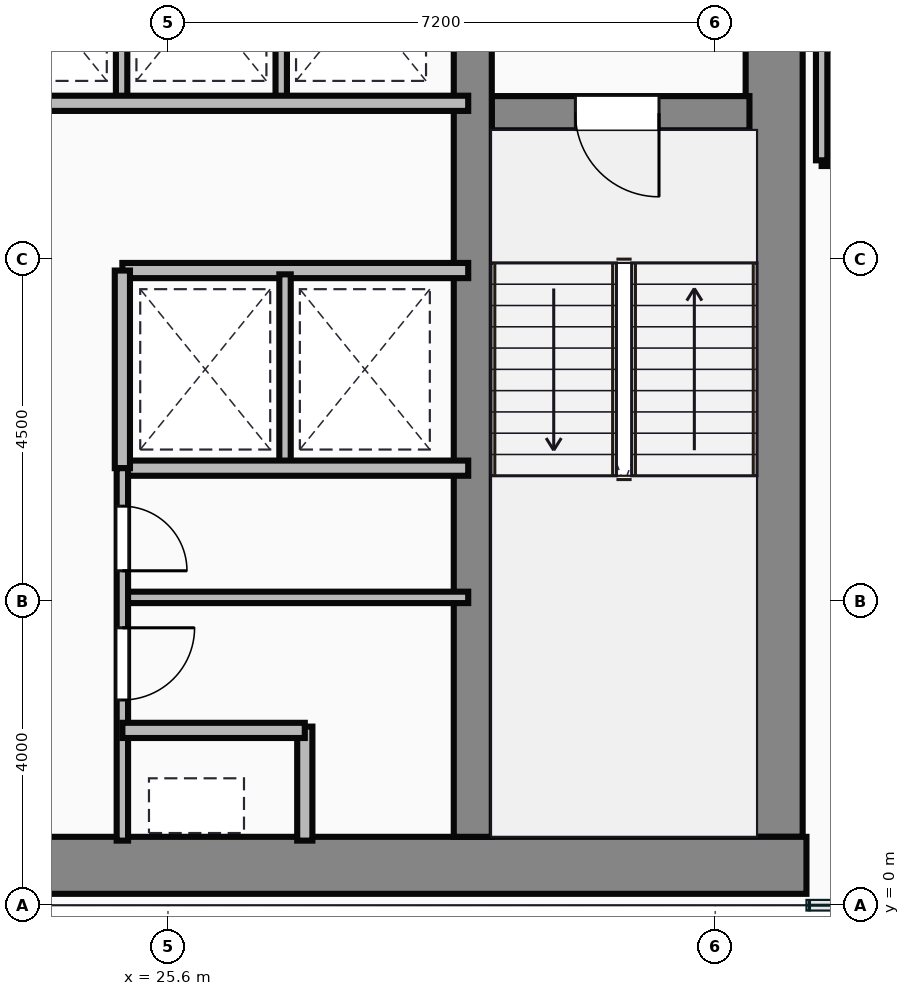
"""IFC4 building model, lengths in metres.
Left out: names, types, materials, properties, quantities, classifications, styles, units other than length and angle.
Written with IfcOpenShell. Run it as: python <this file> out.ifc"""

import sys

from ifc_helpers import new_model, si_unit, direction, frame, frame_2d, origin, place, context, subcontext, project, spatial, rectangle, extrude, source, transform, mapped, element, fill, save


model = new_model("IFC4")
c1 = context("Model", 3, precision=1e-05, world=origin(), true_north=direction((0.0, 1.0)))
c2 = subcontext(c1, "Body", "Model", "MODEL_VIEW")
j1 = project(units=[si_unit("LENGTHUNIT", "METRE"), si_unit("PLANEANGLEUNIT", "RADIAN")], contexts=[c1])
p1 = place(None, origin())
s1 = spatial("IfcSite", under=j1, at=p1, CompositionType="ELEMENT")
p2 = place(p1, origin())
s2 = spatial("IfcBuilding", under=s1, at=p2, CompositionType="ELEMENT")
p3 = place(p2, frame((0.0, 0.0, 151.55)))
s3 = spatial("IfcBuildingStorey", under=s2, at=p3, CompositionType="ELEMENT", Elevation=151.55)
m1 = source(origin(), c2, "Body", "SweptSolid", [
    extrude(rectangle(XDim=29.5, YDim=0.75, at=frame_2d((14.75, 0.0))), origin(), (0.0, 0.0, 1.0), 3.65),
])
p4 = place(p3, frame((4.5, 0.525, 0.0), z_axis=(0.0, 0.0, 1.0), x_axis=(1.0, 0.0, 0.0)))
e1 = element("IfcWall", 1, at=p4, inside=s3, PredefinedType="SHEAR", context=c2, shape_type="MappedRepresentation", body=[
    mapped(m1, transform((0.0, 0.0, 0.0))),
])
m2 = source(origin(), c2, "Body", "SweptSolid", [
    extrude(rectangle(XDim=13.1, YDim=0.75, at=frame_2d((6.55, 0.0))), origin(), (0.0, 0.0, 1.0), 3.65),
])
p5 = place(p3, frame((33.575, 0.9, 0.0), z_axis=(0.0, 0.0, 1.0), x_axis=(0.0, 1.0, 0.0)))
e2 = element("IfcWall", 2, at=p5, inside=s3, PredefinedType="SHEAR", context=c2, shape_type="MappedRepresentation", body=[
    mapped(m2, transform((0.0, 0.0, 0.0))),
])
m3 = source(origin(), c2, "Body", "SweptSolid", [
    extrude(rectangle(XDim=12.35, YDim=0.5, at=frame_2d((6.175, 0.0))), origin(), (0.0, 0.0, 1.0), 3.65),
])
p6 = place(p3, frame((29.61, 0.9, 0.0), z_axis=(0.0, 0.0, 1.0), x_axis=(0.0, 1.0, 0.0)))
e3 = element("IfcWall", 3, at=p6, inside=s3, PredefinedType="SHEAR", context=c2, shape_type="MappedRepresentation", body=[
    mapped(m3, transform((0.0, 0.0, 0.0))),
])
m4 = source(origin(), c2, "Body", "SweptSolid", [
    extrude(rectangle(XDim=3.39, YDim=0.45, at=frame_2d((1.695, 0.0))), origin(), (0.0, 0.0, 1.0), 3.65),
])
p7 = place(p3, frame((29.86, 10.42, 0.0), z_axis=(0.0, 0.0, 1.0), x_axis=(1.0, 0.0, 0.0)))
e4 = element("IfcWall", 4, at=p7, inside=s3, PredefinedType="SHEAR", context=c2, shape_type="MappedRepresentation", body=[
    mapped(m4, transform((0.0, 0.0, 0.0))),
])
p8 = place(p7, frame((1.1, 0.0, 0.0)))
e5 = element("IfcOpeningElement", 5, at=p8, cuts=e4, PredefinedType="OPENING", context=c2, shape_type="SweptSolid", body=[
    extrude(rectangle(XDim=1.1, YDim=2.15, at=frame_2d((0.55, 1.075))), frame((0.0, 0.235, 0.0), z_axis=(0.0, -1.0, 0.0), x_axis=(1.0, 0.0, 0.0)), (0.0, 0.0, 1.0), 0.47),
])
m5 = source(origin(), c2, "Body", "SweptSolid", [
    extrude(rectangle(XDim=8.8, YDim=0.2, at=frame_2d((4.4, 0.0))), origin(), (0.0, 0.0, 1.0), 3.4),
])
p9 = place(p3, frame((20.75, 10.55, 0.0), z_axis=(0.0, 0.0, 1.0), x_axis=(1.0, 0.0, 0.0)))
e6 = element("IfcWall", 6, at=p9, inside=s3, PredefinedType="PARTITIONING", context=c2, shape_type="MappedRepresentation", body=[
    mapped(m5, transform((0.0, 0.0, 0.0))),
])
m6 = source(origin(), c2, "Body", "SweptSolid", [
    extrude(rectangle(XDim=2.85, YDim=0.15, at=frame_2d((1.425, 0.0))), origin(), (0.0, 0.0, 1.0), 3.4),
])
for number, where, z_axis, x_axis in (
    (7, (24.99, 10.6, 0.0), (0.0, 0.0, 1.0), (0.0, 1.0, 0.0)),
    (8, (27.09, 10.6, 0.0), (0.0, 0.0, 1.0), (0.0, 1.0, 0.0)),
):
    element("IfcWall", number, at=place(p3, frame(where, z_axis=z_axis, x_axis=x_axis)), inside=s3, PredefinedType="PARTITIONING", context=c2, shape_type="MappedRepresentation", body=[
        mapped(m6, transform((0.0, 0.0, 0.0))),
    ])
m7 = source(origin(), c2, "Body", "SweptSolid", [
    extrude(rectangle(XDim=4.55, YDim=0.2, at=frame_2d((2.275, 0.0))), origin(), (0.0, 0.0, 1.0), 3.4),
])
for number, where, z_axis, x_axis in (
    (9, (25.0, 8.35, 0.0), (0.0, 0.0, 1.0), (1.0, 0.0, 0.0)),
    (10, (25.0, 5.75, 0.0), (0.0, 0.0, 1.0), (1.0, 0.0, 0.0)),
):
    element("IfcWall", number, at=place(p3, frame(where, z_axis=z_axis, x_axis=x_axis)), inside=s3, PredefinedType="PARTITIONING", context=c2, shape_type="MappedRepresentation", body=[
        mapped(m7, transform((0.0, 0.0, 0.0))),
    ])
m8 = source(origin(), c2, "Body", "SweptSolid", [
    extrude(rectangle(XDim=2.6, YDim=0.2, at=frame_2d((1.3, 0.0))), origin(), (0.0, 0.0, 1.0), 3.4),
])
p10 = place(p3, frame((25.0, 5.75, 0.0), z_axis=(0.0, 0.0, 1.0), x_axis=(0.0, 1.0, 0.0)))
e11 = element("IfcWall", 11, at=p10, inside=s3, PredefinedType="PARTITIONING", context=c2, shape_type="MappedRepresentation", body=[
    mapped(m8, transform((0.0, 0.0, 0.0))),
])
m9 = source(origin(), c2, "Body", "SweptSolid", [
    extrude(rectangle(XDim=2.5, YDim=0.15, at=frame_2d((1.25, 0.0))), origin(), (0.0, 0.0, 1.0), 3.4),
])
p11 = place(p3, frame((27.14, 5.8, 0.0), z_axis=(0.0, 0.0, 1.0), x_axis=(0.0, 1.0, 0.0)))
e12 = element("IfcWall", 12, at=p11, inside=s3, PredefinedType="PARTITIONING", context=c2, shape_type="MappedRepresentation", body=[
    mapped(m9, transform((0.0, 0.0, 0.0))),
])
m10 = source(origin(), c2, "Body", "SweptSolid", [
    extrude(rectangle(XDim=4.9, YDim=0.15, at=frame_2d((2.45, 0.0))), origin(), (0.0, 0.0, 1.0), 3.4),
])
p12 = place(p3, frame((25.0, 0.85, 0.0), z_axis=(0.0, 0.0, 1.0), x_axis=(0.0, 1.0, 0.0)))
e13 = element("IfcWall", 13, at=p12, inside=s3, PredefinedType="PARTITIONING", context=c2, shape_type="MappedRepresentation", body=[
    mapped(m10, transform((0.0, 0.0, 0.0))),
])
p13 = place(p12, frame((1.85, 0.0, 0.0)))
e14 = element("IfcOpeningElement", 14, at=p13, cuts=e13, PredefinedType="OPENING", context=c2, shape_type="SweptSolid", body=[
    extrude(rectangle(XDim=0.95, YDim=2.15, at=frame_2d((0.475, 1.075))), frame((0.0, 0.085, 0.0), z_axis=(0.0, -1.0, 0.0), x_axis=(1.0, 0.0, 0.0)), (0.0, 0.0, 1.0), 0.17),
])
p14 = place(p12, frame((3.55, 0.0, 0.0)))
e15 = element("IfcOpeningElement", 15, at=p14, cuts=e13, PredefinedType="OPENING", context=c2, shape_type="SweptSolid", body=[
    extrude(rectangle(XDim=0.85, YDim=2.15, at=frame_2d((0.425, 1.075))), frame((0.0, 0.085, 0.0), z_axis=(0.0, -1.0, 0.0), x_axis=(1.0, 0.0, 0.0)), (0.0, 0.0, 1.0), 0.17),
])
m11 = source(origin(), c2, "Body", "SweptSolid", [
    extrude(rectangle(XDim=2.4, YDim=0.2, at=frame_2d((1.2, 0.0))), origin(), (0.0, 0.0, 1.0), 3.4),
])
p15 = place(p3, frame((25.0, 2.3, 0.0), z_axis=(0.0, 0.0, 1.0), x_axis=(1.0, 0.0, 0.0)))
e16 = element("IfcWall", 16, at=p15, inside=s3, PredefinedType="PARTITIONING", context=c2, shape_type="MappedRepresentation", body=[
    mapped(m11, transform((0.0, 0.0, 0.0))),
])
m12 = source(origin(), c2, "Body", "SweptSolid", [
    extrude(rectangle(XDim=1.5, YDim=0.2, at=frame_2d((0.75, 0.0))), origin(), (0.0, 0.0, 1.0), 3.4),
])
p16 = place(p3, frame((27.4, 0.85, 0.0), z_axis=(0.0, 0.0, 1.0), x_axis=(0.0, 1.0, 0.0)))
e17 = element("IfcWall", 17, at=p16, inside=s3, PredefinedType="PARTITIONING", context=c2, shape_type="MappedRepresentation", body=[
    mapped(m12, transform((0.0, 0.0, 0.0))),
])
m13 = source(origin(), c2, "Body", "SweptSolid", [
    extrude(rectangle(XDim=4.55, YDim=0.15, at=frame_2d((2.275, 0.0))), origin(), (0.0, 0.0, 1.0), 3.4),
])
p17 = place(p3, frame((25.0, 4.05, 0.0), z_axis=(0.0, 0.0, 1.0), x_axis=(1.0, 0.0, 0.0)))
e18 = element("IfcWall", 18, at=p17, inside=s3, PredefinedType="PARTITIONING", context=c2, shape_type="MappedRepresentation", body=[
    mapped(m13, transform((0.0, 0.0, 0.0))),
])
m14 = source(origin(), c2, "Body", "SweptSolid", [
    extrude(rectangle(XDim=4.8, YDim=0.15, at=frame_2d((2.4, 0.0))), origin(), (0.0, 0.0, 1.0), 3.4),
])
p18 = place(p3, frame((34.2, 9.8, 0.0), z_axis=(0.0, 0.0, 1.0), x_axis=(1.0, 0.0, 0.0)))
e19 = element("IfcWall", 19, at=p18, inside=s3, PredefinedType="PARTITIONING", context=c2, shape_type="MappedRepresentation", body=[
    mapped(m14, transform((0.0, 0.0, 0.0))),
])
m15 = source(origin(), c2, "Body", "SweptSolid", [
    extrude(rectangle(XDim=4.18, YDim=0.15, at=frame_2d((2.09, 0.0))), origin(), (0.0, 0.0, 1.0), 3.4),
])
p19 = place(p3, frame((34.2, 9.8, 0.0), z_axis=(0.0, 0.0, 1.0), x_axis=(0.0, 1.0, 0.0)))
e20 = element("IfcWall", 20, at=p19, inside=s3, PredefinedType="PARTITIONING", context=c2, shape_type="MappedRepresentation", body=[
    mapped(m15, transform((0.0, 0.0, 0.0))),
])
m16 = source(origin(), c2, "Body", "SweptSolid", [
    extrude(rectangle(XDim=1.1, YDim=2.15, at=frame_2d((0.55, 1.075))), frame((0.0, 0.025, 0.0), z_axis=(0.0, -1.0, 0.0), x_axis=(1.0, 0.0, 0.0)), (0.0, 0.0, 1.0), 0.05),
])
p20 = place(p8, frame((1.1, 0.0, 0.0), z_axis=(0.0, 0.0, 1.0), x_axis=(-1.0, 0.0, 0.0)))
e21 = element("IfcDoor", 21, at=p20, inside=s3, OperationType="SINGLE_SWING_RIGHT", PredefinedType="DOOR", context=c2, shape_type="MappedRepresentation", body=[
    mapped(m16, transform((0.0, 0.0, 0.0))),
])
fill(e5, e21)
m17 = source(origin(), c2, "Body", "SweptSolid", [
    extrude(rectangle(XDim=0.95, YDim=2.15, at=frame_2d((0.475, 1.075))), frame((0.0, 0.025, 0.0), z_axis=(0.0, -1.0, 0.0), x_axis=(1.0, 0.0, 0.0)), (0.0, 0.0, 1.0), 0.05),
])
p21 = place(p13, origin())
e22 = element("IfcDoor", 22, at=p21, inside=s3, OperationType="SINGLE_SWING_RIGHT", PredefinedType="DOOR", context=c2, shape_type="MappedRepresentation", body=[
    mapped(m17, transform((0.0, 0.0, 0.0))),
])
fill(e14, e22)
m18 = source(origin(), c2, "Body", "SweptSolid", [
    extrude(rectangle(XDim=0.85, YDim=2.15, at=frame_2d((0.425, 1.075))), frame((0.0, 0.025, 0.0), z_axis=(0.0, -1.0, 0.0), x_axis=(1.0, 0.0, 0.0)), (0.0, 0.0, 1.0), 0.05),
])
p22 = place(p14, origin())
e23 = element("IfcDoor", 23, at=p22, inside=s3, OperationType="SINGLE_SWING_LEFT", PredefinedType="DOOR", context=c2, shape_type="MappedRepresentation", body=[
    mapped(m18, transform((0.0, 0.0, 0.0))),
])
fill(e15, e23)
save(model, sys.argv[1])
